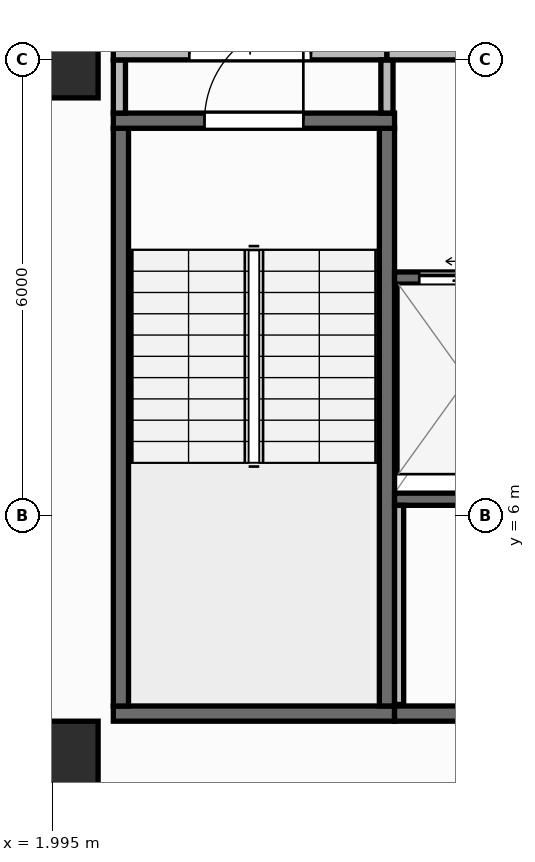
"""IFC4 building model, lengths in metres.
Left out: names, types, materials, properties, quantities, classifications, styles, units other than length and angle.
Written with IfcOpenShell. Run it as: python <this file> out.ifc"""

import sys

from ifc_helpers import new_model, si_unit, direction, frame, frame_2d, origin, origin_2d, place, context, subcontext, project, spatial, rectangle, extrude, element, fill, save


model = new_model("IFC4")
c1 = context("Model", 3, precision=1e-05, world=origin(), true_north=direction((0.0, 1.0)))
c2 = subcontext(c1, "Body", "Model", "MODEL_VIEW")
j1 = project(units=[si_unit("LENGTHUNIT", "METRE"), si_unit("PLANEANGLEUNIT", "RADIAN")], contexts=[c1])
p1 = place(None, origin())
s1 = spatial("IfcSite", under=j1, at=p1, CompositionType="ELEMENT")
p2 = place(p1, origin())
s2 = spatial("IfcBuilding", under=s1, at=p2, CompositionType="ELEMENT")
p3 = place(p2, frame((0.0, 0.0, 215.8)))
s3 = spatial("IfcBuildingStorey", under=s2, at=p3, CompositionType="ELEMENT", Elevation=215.8)
for number, where, z_axis, x_axis in (
    (1, (2.1, 2.8, 0.0), (0.0, 0.0, 1.0), (1.0, 0.0, 0.0)),
    (2, (2.1, 12.0, 0.0), (0.0, 0.0, 1.0), (1.0, 0.0, 0.0)),
):
    element("IfcColumn", number, at=place(p3, frame(where, z_axis=z_axis, x_axis=x_axis)), inside=s3, PredefinedType="COLUMN", context=c2, shape_type="SweptSolid", body=[
        extrude(rectangle(XDim=1.0, YDim=1.0, at=origin_2d()), origin(), (0.0, 0.0, 1.0), 3.95),
    ])
p4 = place(p3, frame((2.66, 0.174, 0.0), z_axis=(0.0, 0.0, 1.0), x_axis=(0.996634028439, 0.081979347142, 0.0)))
e3 = element("IfcWall", 3, at=p4, inside=s3, PredefinedType="STANDARD", context=c2, shape_type="SweptSolid", body=[
    extrude(rectangle(XDim=46.035, YDim=0.26, at=frame_2d((23.018, 0.0))), origin(), (0.0, 0.0, 1.0), 3.71),
])
p5 = place(p4, frame((21.817, 0.0, 0.9)))
e4 = element("IfcOpeningElement", 4, at=p5, cuts=e3, PredefinedType="OPENING", context=c2, shape_type="SweptSolid", body=[
    extrude(rectangle(XDim=2.4, YDim=1.65, at=frame_2d((1.2, 0.825))), frame((0.0, 0.14, 0.0), z_axis=(0.0, -1.0, 0.0), x_axis=(1.0, 0.0, 0.0)), (0.0, 0.0, 1.0), 0.28),
])
p6 = place(p3, frame((2.8, 3.4, 0.0), z_axis=(0.0, 0.0, 1.0), x_axis=(1.0, 0.0, 0.0)))
e5 = element("IfcWall", 5, at=p6, inside=s3, PredefinedType="SHEAR", context=c2, shape_type="SweptSolid", body=[
    extrude(rectangle(XDim=3.7, YDim=0.2, at=frame_2d((1.85, 0.0))), origin(), (0.0, 0.0, 1.0), 3.71),
])
for number, where, z_axis, x_axis in (
    (6, (2.9, 3.5, 0.0), (0.0, 0.0, 1.0), (0.0, 1.0, 0.0)),
    (7, (6.4, 3.5, 0.0), (0.0, 0.0, 1.0), (0.0, 1.0, 0.0)),
):
    element("IfcWall", number, at=place(p3, frame(where, z_axis=z_axis, x_axis=x_axis)), inside=s3, PredefinedType="SHEAR", context=c2, shape_type="SweptSolid", body=[
        extrude(rectangle(XDim=7.6, YDim=0.2, at=frame_2d((3.8, 0.0))), origin(), (0.0, 0.0, 1.0), 3.71),
    ])
p7 = place(p3, frame((2.8, 11.2, 0.0), z_axis=(0.0, 0.0, 1.0), x_axis=(1.0, 0.0, 0.0)))
e8 = element("IfcWall", 8, at=p7, inside=s3, PredefinedType="SHEAR", context=c2, shape_type="SweptSolid", body=[
    extrude(rectangle(XDim=3.7, YDim=0.2, at=frame_2d((1.85, 0.0))), origin(), (0.0, 0.0, 1.0), 3.71),
])
p8 = place(p7, frame((1.2, 0.0, 0.0)))
e9 = element("IfcOpeningElement", 9, at=p8, cuts=e8, PredefinedType="OPENING", context=c2, shape_type="SweptSolid", body=[
    extrude(rectangle(XDim=1.3, YDim=2.15, at=frame_2d((0.65, 1.075))), frame((0.0, 0.11, 0.0), z_axis=(0.0, -1.0, 0.0), x_axis=(1.0, 0.0, 0.0)), (0.0, 0.0, 1.0), 0.22),
])
p9 = place(p3, frame((6.5, 3.4, 0.0), z_axis=(0.0, 0.0, 1.0), x_axis=(1.0, 0.0, 0.0)))
e10 = element("IfcWall", 10, at=p9, inside=s3, PredefinedType="SHEAR", context=c2, shape_type="SweptSolid", body=[
    extrude(rectangle(XDim=13.7, YDim=0.2, at=frame_2d((6.85, 0.0))), origin(), (0.0, 0.0, 1.0), 3.71),
])
p10 = place(p3, frame((6.5, 6.22, 0.0), z_axis=(0.0, 0.0, 1.0), x_axis=(1.0, 0.0, 0.0)))
e11 = element("IfcWall", 11, at=p10, inside=s3, PredefinedType="SHEAR", context=c2, shape_type="SweptSolid", body=[
    extrude(rectangle(XDim=12.11, YDim=0.16, at=frame_2d((6.055, 0.0))), origin(), (0.0, 0.0, 1.0), 3.71),
])
p11 = place(p3, frame((6.5, 9.13, 0.0), z_axis=(0.0, 0.0, 1.0), x_axis=(1.0, 0.0, 0.0)))
e12 = element("IfcWall", 12, at=p11, inside=s3, PredefinedType="SHEAR", context=c2, shape_type="SweptSolid", body=[
    extrude(rectangle(XDim=1.975, YDim=0.16, at=frame_2d((0.988, 0.0))), origin(), (0.0, 0.0, 1.0), 3.71),
])
p12 = place(p11, frame((0.325, 0.0, 0.0)))
e13 = element("IfcOpeningElement", 13, at=p12, cuts=e12, PredefinedType="OPENING", context=c2, shape_type="SweptSolid", body=[
    extrude(rectangle(XDim=1.25, YDim=2.15, at=frame_2d((0.625, 1.075))), frame((0.0, 0.09, 0.0), z_axis=(0.0, -1.0, 0.0), x_axis=(1.0, 0.0, 0.0)), (0.0, 0.0, 1.0), 0.18),
])
p13 = place(p3, frame((6.56, 3.52, 0.0), z_axis=(0.0, 0.0, 1.0), x_axis=(0.0, 1.0, 0.0)))
e14 = element("IfcWall", 14, at=p13, inside=s3, PredefinedType="PARTITIONING", context=c2, shape_type="SweptSolid", body=[
    extrude(rectangle(XDim=2.62, YDim=0.12, at=frame_2d((1.31, 0.0))), origin(), (0.0, 0.0, 1.0), 3.71),
])
p14 = place(p3, frame((2.88, 11.3, 0.0), z_axis=(0.0, 0.0, 1.0), x_axis=(0.0, 1.0, 0.0)))
e15 = element("IfcWall", 15, at=p14, inside=s3, PredefinedType="PARTITIONING", context=c2, shape_type="SweptSolid", body=[
    extrude(rectangle(XDim=0.7, YDim=0.16, at=frame_2d((0.35, 0.0))), origin(), (0.0, 0.0, 1.0), 3.71),
])
p15 = place(p3, frame((2.8, 12.08, 0.0), z_axis=(0.0, 0.0, 1.0), x_axis=(1.0, 0.0, 0.0)))
e16 = element("IfcWall", 16, at=p15, inside=s3, PredefinedType="PARTITIONING", context=c2, shape_type="SweptSolid", body=[
    extrude(rectangle(XDim=3.6, YDim=0.16, at=frame_2d((1.8, 0.0))), origin(), (0.0, 0.0, 1.0), 3.152),
])
p16 = place(p15, frame((1.0, 0.0, 0.0)))
e17 = element("IfcOpeningElement", 17, at=p16, cuts=e16, PredefinedType="OPENING", context=c2, shape_type="SweptSolid", body=[
    extrude(rectangle(XDim=1.6, YDim=2.05, at=frame_2d((0.8, 1.025))), frame((0.0, 0.09, 0.0), z_axis=(0.0, -1.0, 0.0), x_axis=(1.0, 0.0, 0.0)), (0.0, 0.0, 1.0), 0.18),
])
p17 = place(p3, frame((6.4, 11.3, 0.0), z_axis=(0.0, 0.0, 1.0), x_axis=(0.0, 1.0, 0.0)))
e18 = element("IfcWall", 18, at=p17, inside=s3, PredefinedType="PARTITIONING", context=c2, shape_type="SweptSolid", body=[
    extrude(rectangle(XDim=0.7, YDim=0.16, at=frame_2d((0.35, 0.0))), origin(), (0.0, 0.0, 1.0), 3.71),
])
p18 = place(p3, frame((6.4, 12.08, 0.0), z_axis=(0.0, 0.0, 1.0), x_axis=(1.0, 0.0, 0.0)))
e19 = element("IfcWall", 19, at=p18, inside=s3, PredefinedType="PARTITIONING", context=c2, shape_type="SweptSolid", body=[
    extrude(rectangle(XDim=6.18, YDim=0.16, at=frame_2d((3.09, 0.0))), origin(), (0.0, 0.0, 1.0), 3.152),
])
p19 = place(p18, frame((2.29, 0.0, 0.0)))
e20 = element("IfcOpeningElement", 20, at=p19, cuts=e19, PredefinedType="OPENING", context=c2, shape_type="SweptSolid", body=[
    extrude(rectangle(XDim=1.6, YDim=2.05, at=frame_2d((0.8, 1.025))), frame((0.0, 0.09, 0.0), z_axis=(0.0, -1.0, 0.0), x_axis=(1.0, 0.0, 0.0)), (0.0, 0.0, 1.0), 0.18),
])
p20 = place(p8, origin())
e21 = element("IfcDoor", 21, at=p20, inside=s3, OperationType="SINGLE_SWING_RIGHT", PredefinedType="DOOR", context=c2, shape_type="SweptSolid", body=[
    extrude(rectangle(XDim=1.3, YDim=2.15, at=frame_2d((0.65, 1.075))), frame((0.0, 0.025, 0.0), z_axis=(0.0, -1.0, 0.0), x_axis=(1.0, 0.0, 0.0)), (0.0, 0.0, 1.0), 0.05),
])
fill(e9, e21)
p21 = place(p12, origin())
e22 = element("IfcDoor", 22, at=p21, inside=s3, OperationType="SLIDING_TO_LEFT", PredefinedType="DOOR", context=c2, shape_type="SweptSolid", body=[
    extrude(rectangle(XDim=1.25, YDim=2.15, at=frame_2d((0.625, 1.075))), frame((0.0, 0.025, 0.0), z_axis=(0.0, -1.0, 0.0), x_axis=(1.0, 0.0, 0.0)), (0.0, 0.0, 1.0), 0.05),
])
fill(e13, e22)
p22 = place(p16, origin())
e23 = element("IfcDoor", 23, at=p22, inside=s3, OperationType="DOUBLE_DOOR_SINGLE_SWING", PredefinedType="DOOR", context=c2, shape_type="SweptSolid", body=[
    extrude(rectangle(XDim=1.6, YDim=2.05, at=frame_2d((0.8, 1.025))), frame((0.0, 0.025, 0.0), z_axis=(0.0, -1.0, 0.0), x_axis=(1.0, 0.0, 0.0)), (0.0, 0.0, 1.0), 0.05),
])
fill(e17, e23)
save(model, sys.argv[1])
